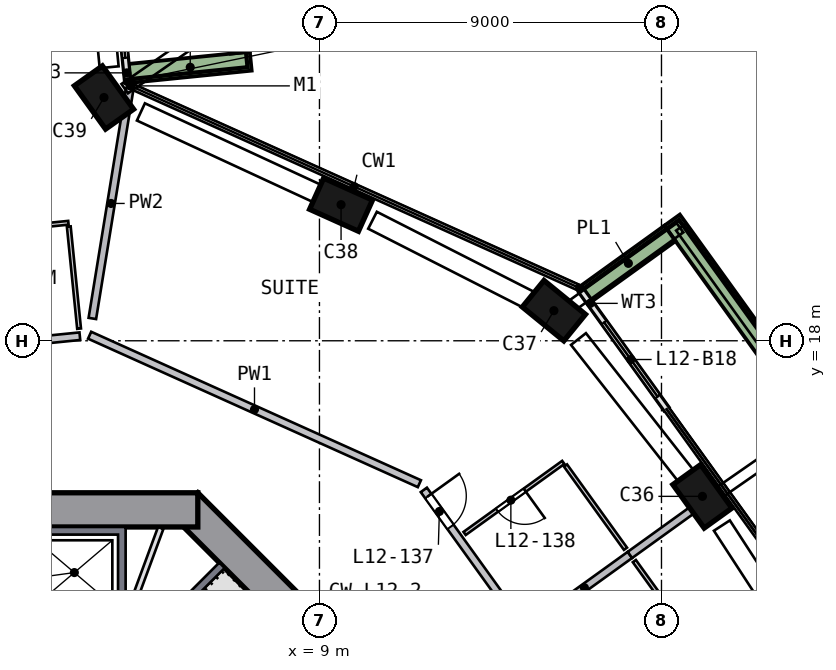
"""IFC4 building model, lengths in metres.
Left out: names, types, materials, properties, quantities, classifications, styles, units other than length and angle.
Written with IfcOpenShell. Run it as: python <this file> out.ifc"""

import sys

from ifc_helpers import new_model, si_unit, direction, frame, frame_2d, origin, origin_2d, place, context, subcontext, project, spatial, polyline, rectangle, outline, extrude, element, fill, save


model = new_model("IFC4")
c1 = context("Model", 3, precision=1e-05, world=origin(), true_north=direction((0.0, 1.0)))
c2 = subcontext(c1, "Body", "Model", "MODEL_VIEW")
j1 = project(units=[si_unit("LENGTHUNIT", "METRE"), si_unit("PLANEANGLEUNIT", "RADIAN")], contexts=[c1])
p1 = place(None, origin())
s1 = spatial("IfcSite", under=j1, at=p1, CompositionType="ELEMENT")
p2 = place(p1, origin())
s2 = spatial("IfcBuilding", under=s1, at=p2, CompositionType="ELEMENT")
p3 = place(p2, frame((0.0, 0.0, 56.5)))
s3 = spatial("IfcBuildingStorey", under=s2, at=p3, CompositionType="ELEMENT", Elevation=56.5)
p4 = place(p3, frame((19.157, 13.796, 0.0), z_axis=(-0.066391509, 0.090651408, 0.993667193), x_axis=(-0.580299679, 0.806614945, -0.112359302)))
e1 = element("IfcColumn", 1, at=p4, inside=s3, PredefinedType="COLUMN", context=c2, shape_type="SweptSolid", body=[
    extrude(rectangle(XDim=1.4, YDim=0.9, at=origin_2d()), origin(), (0.0, 0.0, 1.0), 3.21),
])
p5 = place(p3, frame((15.277, 18.705, 0.0), z_axis=(-0.089560916, 0.071922434, 0.993381098), x_axis=(0.769236277, -0.62855588, 0.114861028)))
e2 = element("IfcColumn", 2, at=p5, inside=s3, PredefinedType="COLUMN", context=c2, shape_type="SweptSolid", body=[
    extrude(rectangle(XDim=1.4, YDim=0.9, at=origin_2d()), origin(), (0.0, 0.0, 1.0), 3.211),
])
p6 = place(p3, frame((9.693, 21.527, 0.0), z_axis=(-0.102744451, 0.045250147, 0.993678017), x_axis=(-0.905958686, 0.408210433, -0.112263538)))
e3 = element("IfcColumn", 3, at=p6, inside=s3, PredefinedType="COLUMN", context=c2, shape_type="SweptSolid", body=[
    extrude(rectangle(XDim=1.4, YDim=0.9, at=origin_2d()), origin(), (0.0, 0.0, 1.0), 3.21),
])
p7 = place(p3, frame((3.47, 24.383, 0.0), z_axis=(-0.116064233, 0.015505634, 0.993120672), x_axis=(0.577080719, -0.812746414, 0.080131833)))
e4 = element("IfcColumn", 4, at=p7, inside=s3, PredefinedType="COLUMN", context=c2, shape_type="SweptSolid", body=[
    extrude(rectangle(XDim=1.4, YDim=0.9, at=origin_2d()), origin(), (0.0, 0.0, 1.0), 3.212),
])
p8 = place(p3, frame((13.682, 5.481, 0.0), z_axis=(0.0, 0.0, 1.0), x_axis=(-0.707106781, 0.707106781, 0.0)))
e5 = element("IfcWall", 5, at=p8, inside=s3, PredefinedType="SHEAR", context=c2, shape_type="SweptSolid", body=[
    extrude(rectangle(XDim=11.598, YDim=0.9, at=frame_2d((5.799, 0.0))), origin(), (0.0, 0.0, 1.0), 3.5),
])
p9 = place(p8, frame((2.099, 0.0, 0.0)))
e6 = element("IfcOpeningElement", 6, at=p9, cuts=e5, PredefinedType="OPENING", context=c2, shape_type="SweptSolid", body=[
    extrude(rectangle(XDim=1.2, YDim=2.1, at=frame_2d((0.6, 1.05))), frame((0.0, 0.46, 0.0), z_axis=(0.0, -1.0, 0.0), x_axis=(1.0, 0.0, 0.0)), (0.0, 0.0, 1.0), 0.92),
])
p10 = place(p3, frame((5.799, 13.55, 0.0), z_axis=(0.0, 0.0, 1.0), x_axis=(-1.0, 0.0, 0.0)))
e7 = element("IfcWall", 7, at=p10, inside=s3, PredefinedType="SHEAR", context=c2, shape_type="SweptSolid", body=[
    extrude(rectangle(XDim=11.598, YDim=0.9, at=frame_2d((5.799, 0.0))), origin(), (0.0, 0.0, 1.0), 3.5),
])
p11 = place(p10, frame((4.899, 0.0, 0.0)))
e8 = element("IfcOpeningElement", 8, at=p11, cuts=e7, PredefinedType="OPENING", context=c2, shape_type="SweptSolid", body=[
    extrude(rectangle(XDim=1.8, YDim=2.1, at=frame_2d((0.9, 1.05))), frame((0.0, 0.46, 0.0), z_axis=(0.0, -1.0, 0.0), x_axis=(1.0, 0.0, 0.0)), (0.0, 0.0, 1.0), 0.92),
])
p12 = place(p3, frame((3.951, 24.85, 0.0), z_axis=(0.0, 0.0, 1.0), x_axis=(-0.100315267, 0.994955701, 0.0)))
e9 = element("IfcWall", 9, at=p12, inside=s3, PredefinedType="SOLIDWALL", context=c2, shape_type="SweptSolid", body=[
    extrude(rectangle(XDim=2.502, YDim=0.15, at=frame_2d((1.251, 0.0))), origin(), (0.0, 0.0, 1.0), 2.425),
])
p13 = place(p12, frame((0.602, 0.0, 0.0)))
e10 = element("IfcOpeningElement", 10, at=p13, cuts=e9, PredefinedType="OPENING", context=c2, shape_type="SweptSolid", body=[
    extrude(rectangle(XDim=1.5, YDim=2.4, at=frame_2d((0.75, 1.2))), frame((0.0, 0.085, 0.0), z_axis=(0.0, -1.0, 0.0), x_axis=(1.0, 0.0, 0.0)), (0.0, 0.0, 1.0), 0.17),
])
p14 = place(p3, frame((18.129, 16.208, 0.0), z_axis=(0.0, 0.0, 1.0), x_axis=(-0.584431958, 0.811442719, 0.0)))
e11 = element("IfcWall", 11, at=p14, inside=s3, PredefinedType="SOLIDWALL", context=c2, shape_type="SweptSolid", body=[
    extrude(rectangle(XDim=3.842, YDim=0.15, at=frame_2d((1.921, 0.0))), origin(), (0.0, 0.0, 1.0), 2.425),
])
p15 = place(p14, frame((0.4, 0.0, 0.0)))
e12 = element("IfcOpeningElement", 12, at=p15, cuts=e11, PredefinedType="OPENING", context=c2, shape_type="SweptSolid", body=[
    extrude(rectangle(XDim=2.4, YDim=2.4, at=frame_2d((1.2, 1.2))), frame((0.0, 0.085, 0.0), z_axis=(0.0, -1.0, 0.0), x_axis=(1.0, 0.0, 0.0)), (0.0, 0.0, 1.0), 0.17),
])
p16 = place(p3, frame((26.3, 10.039, 0.0), z_axis=(0.0, 0.0, 1.0), x_axis=(-0.5843858, 0.811475962, 0.0)))
e13 = element("IfcWall", 13, at=p16, inside=s3, PredefinedType="SOLIDWALL", context=c2, shape_type="SweptSolid", body=[
    extrude(rectangle(XDim=13.723, YDim=0.5, at=frame_2d((6.862, 0.0))), origin(), (0.0, 0.0, 1.0), 0.7),
])
p17 = place(p3, frame((18.223, 20.826, 0.0), z_axis=(0.0, 0.0, 1.0), x_axis=(-0.811453698, -0.584416714, 0.0)))
e14 = element("IfcWall", 14, at=p17, inside=s3, PredefinedType="SOLIDWALL", context=c2, shape_type="SweptSolid", body=[
    extrude(rectangle(XDim=2.699, YDim=0.5, at=frame_2d((1.35, 0.0))), origin(), (0.0, 0.0, 1.0), 0.7),
])
p18 = place(p3, frame((4.009, 25.037, 0.0), z_axis=(0.0, 0.0, 1.0), x_axis=(0.994951439, 0.100357532, 0.0)))
e15 = element("IfcWall", 15, at=p18, inside=s3, PredefinedType="SOLIDWALL", context=c2, shape_type="SweptSolid", body=[
    extrude(rectangle(XDim=3.199, YDim=0.5, at=frame_2d((1.6, 0.0))), origin(), (0.0, 0.0, 1.0), 0.7),
])
p19 = place(p3, frame((6.917, 25.582, 0.0), z_axis=(0.0, 0.0, 1.0), x_axis=(-0.100360478, 0.994951142, 0.0)))
e16 = element("IfcWall", 16, at=p19, inside=s3, PredefinedType="SOLIDWALL", context=c2, shape_type="SweptSolid", body=[
    extrude(rectangle(XDim=15.771, YDim=0.5, at=frame_2d((7.885, 0.0))), origin(), (0.0, 0.0, 1.0), 0.7),
])
p20 = place(p3, origin())
e17 = element("IfcWall", 17, at=p20, inside=s3, PredefinedType="SOLIDWALL", context=c2, shape_type="SweptSolid", body=[
    extrude(outline(polyline([(3.9, 13.1), (3.9, 10.9), (3.7, 10.9), (3.7, 12.9), (1.4, 12.9), (1.4, 10.9), (1.2, 10.9), (1.2, 13.1), (3.9, 13.1)])), origin(), (0.0, 0.0, 1.0), 3.19),
])
p21 = place(p3, frame((3.677, 9.334, 0.0), z_axis=(0.0, 0.0, 1.0), x_axis=(0.707106781, 0.707106781, 0.0)))
e18 = element("IfcWall", 18, at=p21, inside=s3, PredefinedType="SOLIDWALL", context=c2, shape_type="SweptSolid", body=[
    extrude(rectangle(XDim=3.9, YDim=0.2, at=frame_2d((1.95, 0.0))), origin(), (0.0, 0.0, 1.0), 3.19),
])
p22 = place(p3, frame((1.776, 4.813, 0.0), z_axis=(0.0, 0.0, 1.0), x_axis=(0.346112737, 0.93819293, 0.0)))
e19 = element("IfcWall", 19, at=p22, inside=s3, PredefinedType="PARTITIONING", context=c2, shape_type="SweptSolid", body=[
    extrude(rectangle(XDim=8.803, YDim=0.15, at=frame_2d((4.402, 0.0))), origin(), (0.0, 0.0, 1.0), 3.19),
])
p23 = place(p22, frame((1.4, 0.0, 0.0)))
e20 = element("IfcOpeningElement", 20, at=p23, cuts=e19, PredefinedType="OPENING", context=c2, shape_type="SweptSolid", body=[
    extrude(rectangle(XDim=1.8, YDim=2.1, at=frame_2d((0.9, 1.05))), frame((0.0, 0.085, 0.0), z_axis=(0.0, -1.0, 0.0), x_axis=(1.0, 0.0, 0.0)), (0.0, 0.0, 1.0), 0.17),
])
p24 = place(p3, frame((2.695, 18.12, 0.0), z_axis=(0.0, 0.0, 1.0), x_axis=(-0.994948641, -0.100385263, 0.0)))
e21 = element("IfcWall", 21, at=p24, inside=s3, PredefinedType="SOLIDWALL", context=c2, shape_type="SweptSolid", body=[
    extrude(rectangle(XDim=3.4, YDim=0.2, at=frame_2d((1.7, 0.0))), origin(), (0.0, 0.0, 1.0), 3.19),
])
p25 = place(p3, frame((11.629, 14.239, 0.0), z_axis=(0.0, 0.0, 1.0), x_axis=(-0.911829794, 0.410568419, 0.0)))
e22 = element("IfcWall", 22, at=p25, inside=s3, PredefinedType="SOLIDWALL", context=c2, shape_type="SweptSolid", body=[
    extrude(rectangle(XDim=9.516, YDim=0.2, at=frame_2d((4.758, 0.0))), origin(), (0.0, 0.0, 1.0), 3.19),
])
p26 = place(p3, frame((11.747, 14.076, 0.0), z_axis=(0.0, 0.0, 1.0), x_axis=(0.584392911, -0.811470841, 0.0)))
e23 = element("IfcWall", 23, at=p26, inside=s3, PredefinedType="SOLIDWALL", context=c2, shape_type="SweptSolid", body=[
    extrude(rectangle(XDim=9.116, YDim=0.2, at=frame_2d((4.558, 0.0))), origin(), (0.0, 0.0, 1.0), 3.19),
])
p27 = place(p26, frame((0.2, 0.0, 0.0)))
e24 = element("IfcOpeningElement", 24, at=p27, cuts=e23, PredefinedType="OPENING", context=c2, shape_type="SweptSolid", body=[
    extrude(rectangle(XDim=1.0, YDim=2.1, at=frame_2d((0.5, 1.05))), frame((0.0, 0.11, 0.0), z_axis=(0.0, -1.0, 0.0), x_axis=(1.0, 0.0, 0.0)), (0.0, 0.0, 1.0), 0.22),
])
p28 = place(p3, frame((4.009, 24.64, 0.0), z_axis=(0.0, 0.0, 1.0), x_axis=(-0.160569165, -0.987024591, 0.0)))
e25 = element("IfcWall", 25, at=p28, inside=s3, PredefinedType="SOLIDWALL", context=c2, shape_type="SweptSolid", body=[
    extrude(rectangle(XDim=6.132, YDim=0.2, at=frame_2d((3.066, 0.0))), origin(), (0.0, 0.0, 1.0), 3.19),
])
p29 = place(p3, frame((14.773, 10.639, 0.0), z_axis=(0.0, 0.0, 1.0), x_axis=(0.811487293, 0.584370065, 0.0)))
e26 = element("IfcWall", 26, at=p29, inside=s3, PredefinedType="SOLIDWALL", context=c2, shape_type="SweptSolid", body=[
    extrude(rectangle(XDim=2.953, YDim=0.2, at=frame_2d((1.477, 0.0))), origin(), (0.0, 0.0, 1.0), 3.19),
])
p30 = place(p3, frame((17.169, 12.365, 0.0), z_axis=(0.0, 0.0, 1.0), x_axis=(0.811479396, 0.584381032, 0.0)))
e27 = element("IfcWall", 27, at=p30, inside=s3, PredefinedType="SOLIDWALL", context=c2, shape_type="SweptSolid", body=[
    extrude(rectangle(XDim=2.95, YDim=0.2, at=frame_2d((1.475, 0.0))), origin(), (0.0, 0.0, 1.0), 3.19),
])
p31 = place(p3, frame((2.394, 21.105, 0.0), z_axis=(0.0, 0.0, 1.0), x_axis=(-0.994953744, -0.100334676, 0.0)))
e28 = element("IfcWall", 28, at=p31, inside=s3, PredefinedType="PARTITIONING", context=c2, shape_type="SweptSolid", body=[
    extrude(rectangle(XDim=3.2, YDim=0.1, at=frame_2d((1.6, 0.0))), origin(), (0.0, 0.0, 1.0), 3.19),
])
p32 = place(p31, frame((1.25, 0.0, 0.0)))
e29 = element("IfcOpeningElement", 29, at=p32, cuts=e28, PredefinedType="OPENING", context=c2, shape_type="SweptSolid", body=[
    extrude(rectangle(XDim=0.9, YDim=2.1, at=frame_2d((0.45, 1.05))), frame((0.0, 0.06, 0.0), z_axis=(0.0, -1.0, 0.0), x_axis=(1.0, 0.0, 0.0)), (0.0, 0.0, 1.0), 0.12),
])
p33 = place(p3, frame((2.675, 18.319, 0.0), z_axis=(0.0, 0.0, 1.0), x_axis=(-0.100372122, 0.994949967, 0.0)))
e30 = element("IfcWall", 30, at=p33, inside=s3, PredefinedType="PARTITIONING", context=c2, shape_type="SweptSolid", body=[
    extrude(rectangle(XDim=2.7, YDim=0.1, at=frame_2d((1.35, 0.0))), origin(), (0.0, 0.0, 1.0), 3.19),
])
p34 = place(p3, frame((15.416, 14.799, 0.0), z_axis=(0.0, 0.0, 1.0), x_axis=(-0.811459086, -0.584409233, 0.0)))
e31 = element("IfcWall", 31, at=p34, inside=s3, PredefinedType="PARTITIONING", context=c2, shape_type="SweptSolid", body=[
    extrude(rectangle(XDim=3.2, YDim=0.1, at=frame_2d((1.6, 0.0))), origin(), (0.0, 0.0, 1.0), 3.19),
])
p35 = place(p34, frame((1.25, 0.0, 0.0)))
e32 = element("IfcOpeningElement", 32, at=p35, cuts=e31, PredefinedType="OPENING", context=c2, shape_type="SweptSolid", body=[
    extrude(rectangle(XDim=0.9, YDim=2.1, at=frame_2d((0.45, 1.05))), frame((0.0, 0.06, 0.0), z_axis=(0.0, -1.0, 0.0), x_axis=(1.0, 0.0, 0.0)), (0.0, 0.0, 1.0), 0.12),
])
p36 = place(p3, frame((15.475, 14.718, 0.0), z_axis=(0.0, 0.0, 1.0), x_axis=(0.58440715, -0.811460586, 0.0)))
e33 = element("IfcWall", 33, at=p36, inside=s3, PredefinedType="PARTITIONING", context=c2, shape_type="SweptSolid", body=[
    extrude(rectangle(XDim=2.7, YDim=0.1, at=frame_2d((1.35, 0.0))), origin(), (0.0, 0.0, 1.0), 3.19),
])
p37 = place(p3, frame((18.864, 10.011, 0.0), z_axis=(0.0, 0.0, 1.0), x_axis=(-0.584347605, 0.811503467, 0.0)))
e34 = element("IfcWall", 34, at=p37, inside=s3, PredefinedType="PARTITIONING", context=c2, shape_type="SweptSolid", body=[
    extrude(rectangle(XDim=2.7, YDim=0.1, at=frame_2d((1.35, 0.0))), origin(), (0.0, 0.0, 1.0), 3.19),
])
p38 = place(p13, origin())
e35 = element("IfcDoor", 35, at=p38, inside=s3, OperationType="SLIDING_TO_LEFT", PredefinedType="DOOR", context=c2, shape_type="SweptSolid", body=[
    extrude(rectangle(XDim=1.5, YDim=2.4, at=frame_2d((0.75, 1.2))), frame((0.0, 0.025, 0.0), z_axis=(0.0, -1.0, 0.0), x_axis=(1.0, 0.0, 0.0)), (0.0, 0.0, 1.0), 0.05),
])
fill(e10, e35)
p39 = place(p15, origin())
e36 = element("IfcDoor", 36, at=p39, inside=s3, OperationType="SLIDING_TO_RIGHT", PredefinedType="DOOR", context=c2, shape_type="SweptSolid", body=[
    extrude(rectangle(XDim=2.4, YDim=2.4, at=frame_2d((1.2, 1.2))), frame((0.0, 0.025, 0.0), z_axis=(0.0, -1.0, 0.0), x_axis=(1.0, 0.0, 0.0)), (0.0, 0.0, 1.0), 0.05),
])
fill(e12, e36)
p40 = place(p27, origin())
e37 = element("IfcDoor", 37, at=p40, inside=s3, OperationType="SINGLE_SWING_LEFT", PredefinedType="DOOR", context=c2, shape_type="SweptSolid", body=[
    extrude(rectangle(XDim=1.0, YDim=2.1, at=frame_2d((0.5, 1.05))), frame((0.0, 0.025, 0.0), z_axis=(0.0, -1.0, 0.0), x_axis=(1.0, 0.0, 0.0)), (0.0, 0.0, 1.0), 0.05),
])
fill(e24, e37)
p41 = place(p35, origin())
e38 = element("IfcDoor", 38, at=p41, inside=s3, OperationType="SINGLE_SWING_LEFT", PredefinedType="DOOR", context=c2, shape_type="SweptSolid", body=[
    extrude(rectangle(XDim=0.9, YDim=2.1, at=frame_2d((0.45, 1.05))), frame((0.0, 0.025, 0.0), z_axis=(0.0, -1.0, 0.0), x_axis=(1.0, 0.0, 0.0)), (0.0, 0.0, 1.0), 0.05),
])
fill(e32, e38)
save(model, sys.argv[1])
